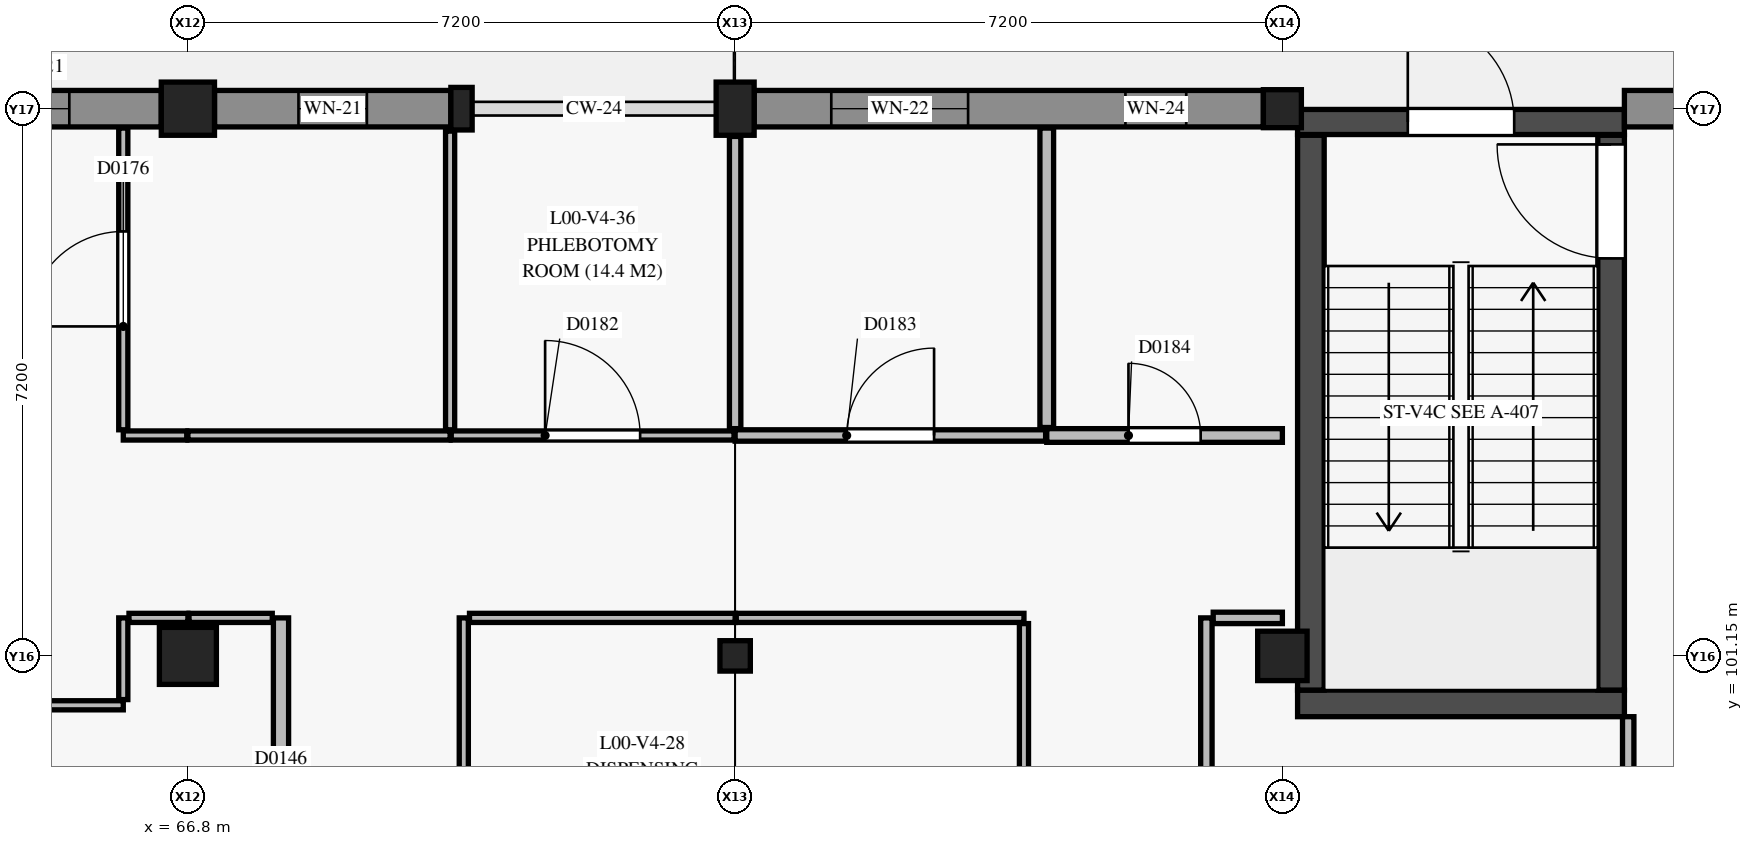
"""IFC4 building model, lengths in metres.
Left out: names, types, materials, properties, quantities, classifications, styles, units other than length and angle.
Written with IfcOpenShell. Run it as: python <this file> out.ifc"""

import sys

from ifc_helpers import new_model, si_unit, direction, frame, frame_2d, origin, origin_2d, place, context, subcontext, project, spatial, rectangle, circle, extrude, element, fill, save


model = new_model("IFC4")
c1 = context("Model", 3, precision=1e-05, world=origin(), true_north=direction((0.0, 1.0)))
c2 = subcontext(c1, "Body", "Model", "MODEL_VIEW")
j1 = project(units=[si_unit("LENGTHUNIT", "METRE"), si_unit("PLANEANGLEUNIT", "RADIAN")], contexts=[c1])
p1 = place(None, origin())
s1 = spatial("IfcSite", under=j1, at=p1, CompositionType="ELEMENT")
p2 = place(p1, origin())
s2 = spatial("IfcBuilding", under=s1, at=p2, CompositionType="ELEMENT")
p3 = place(p2, origin())
s3 = spatial("IfcBuildingStorey", under=s2, at=p3, CompositionType="ELEMENT", Elevation=0.0)
p4 = place(p3, frame((66.8, 101.15, 0.0), z_axis=(0.0, 0.0, 1.0), x_axis=(1.0, 0.0, 0.0)))
e1 = element("IfcColumn", 1, at=p4, inside=s3, PredefinedType="COLUMN", context=c2, shape_type="SweptSolid", body=[
    extrude(rectangle(XDim=0.75, YDim=0.75, at=origin_2d()), origin(), (0.0, 0.0, 1.0), 4.8),
])
p5 = place(p3, frame((66.8, 108.35, 0.0), z_axis=(0.0, 0.0, 1.0), x_axis=(1.0, 0.0, 0.0)))
e2 = element("IfcColumn", 2, at=p5, inside=s3, PredefinedType="COLUMN", context=c2, shape_type="SweptSolid", body=[
    extrude(rectangle(XDim=0.7, YDim=0.7, at=origin_2d()), origin(), (0.0, 0.0, 1.0), 4.8),
])
p6 = place(p3, frame((74.0, 101.15, 0.0), z_axis=(0.0, 0.0, 1.0), x_axis=(1.0, 0.0, 0.0)))
e3 = element("IfcColumn", 3, at=p6, inside=s3, PredefinedType="COLUMN", context=c2, shape_type="SweptSolid", body=[
    extrude(rectangle(XDim=0.4, YDim=0.4, at=origin_2d()), origin(), (0.0, 0.0, 1.0), 4.8),
])
p7 = place(p3, frame((74.0, 108.35, 0.0), z_axis=(0.0, 0.0, 1.0), x_axis=(1.0, 0.0, 0.0)))
e4 = element("IfcColumn", 4, at=p7, inside=s3, PredefinedType="COLUMN", context=c2, shape_type="SweptSolid", body=[
    extrude(rectangle(XDim=0.5, YDim=0.7, at=origin_2d()), origin(), (0.0, 0.0, 1.0), 4.8),
])
p8 = place(p3, frame((81.2, 101.15, 0.0), z_axis=(0.0, 0.0, 1.0), x_axis=(1.0, 0.0, 0.0)))
e5 = element("IfcColumn", 5, at=p8, inside=s3, PredefinedType="COLUMN", context=c2, shape_type="SweptSolid", body=[
    extrude(rectangle(XDim=0.65, YDim=0.65, at=origin_2d()), origin(), (0.0, 0.0, 1.0), 4.8),
])
p9 = place(p3, frame((81.2, 108.35, 0.0), z_axis=(0.0, 0.0, 1.0), x_axis=(1.0, 0.0, 0.0)))
e6 = element("IfcColumn", 6, at=p9, inside=s3, PredefinedType="COLUMN", context=c2, shape_type="SweptSolid", body=[
    extrude(circle(Radius=0.25, at=origin_2d()), origin(), (0.0, 0.0, 1.0), 4.8),
])
p10 = place(p3, frame((70.4, 108.35, 0.0), z_axis=(0.0, 0.0, 1.0), x_axis=(1.0, 0.0, 0.0)))
e7 = element("IfcColumn", 7, at=p10, inside=s3, PredefinedType="PILASTER", context=c2, shape_type="SweptSolid", body=[
    extrude(rectangle(XDim=0.28, YDim=0.56, at=origin_2d()), origin(), (0.0, 0.0, 1.0), 4.8),
])
p11 = place(p3, frame((81.4, 100.525, 0.0), z_axis=(0.0, 0.0, 1.0), x_axis=(1.0, 0.0, 0.0)))
e8 = element("IfcWall", 8, at=p11, inside=s3, PredefinedType="SHEAR", context=c2, shape_type="SweptSolid", body=[
    extrude(rectangle(XDim=4.3, YDim=0.35, at=frame_2d((2.15, 0.0))), origin(), (0.0, 0.0, 1.0), 4.55),
])
p12 = place(p3, frame((81.4, 108.175, 0.0), z_axis=(0.0, 0.0, 1.0), x_axis=(1.0, 0.0, 0.0)))
e9 = element("IfcWall", 9, at=p12, inside=s3, PredefinedType="SHEAR", context=c2, shape_type="SweptSolid", body=[
    extrude(rectangle(XDim=4.3, YDim=0.33, at=frame_2d((2.15, 0.0))), origin(), (0.0, 0.0, 1.0), 4.55),
])
p13 = place(p12, frame((1.45, 0.0, 0.0)))
e10 = element("IfcOpeningElement", 10, at=p13, cuts=e9, PredefinedType="OPENING", context=c2, shape_type="SweptSolid", body=[
    extrude(rectangle(XDim=1.4, YDim=2.25, at=frame_2d((0.7, 1.125))), frame((0.0, 0.175, 0.0), z_axis=(0.0, -1.0, 0.0), x_axis=(1.0, 0.0, 0.0)), (0.0, 0.0, 1.0), 0.35),
])
p14 = place(p3, frame((81.575, 100.7, 0.0), z_axis=(0.0, 0.0, 1.0), x_axis=(0.0, 1.0, 0.0)))
e11 = element("IfcWall", 11, at=p14, inside=s3, PredefinedType="SHEAR", context=c2, shape_type="SweptSolid", body=[
    extrude(rectangle(XDim=7.3, YDim=0.35, at=frame_2d((3.65, 0.0))), origin(), (0.0, 0.0, 1.0), 4.55),
])
p15 = place(p3, frame((85.525, 100.7, 0.0), z_axis=(0.0, 0.0, 1.0), x_axis=(0.0, 1.0, 0.0)))
e12 = element("IfcWall", 12, at=p15, inside=s3, PredefinedType="SHEAR", context=c2, shape_type="SweptSolid", body=[
    extrude(rectangle(XDim=7.3, YDim=0.35, at=frame_2d((3.65, 0.0))), origin(), (0.0, 0.0, 1.0), 4.55),
])
p16 = place(p15, frame((5.68, 0.0, 0.0)))
e13 = element("IfcOpeningElement", 13, at=p16, cuts=e12, PredefinedType="OPENING", context=c2, shape_type="SweptSolid", body=[
    extrude(rectangle(XDim=1.5, YDim=2.15, at=frame_2d((0.75, 1.075))), frame((0.0, 0.185, 0.0), z_axis=(0.0, -1.0, 0.0), x_axis=(1.0, 0.0, 0.0)), (0.0, 0.0, 1.0), 0.37),
])
p17 = place(p3, frame((63.65, 108.35, 0.0), z_axis=(0.0, 0.0, 1.0), x_axis=(1.0, 0.0, 0.0)))
e14 = element("IfcWall", 14, at=p17, inside=s3, PredefinedType="SOLIDWALL", context=c2, shape_type="SweptSolid", body=[
    extrude(rectangle(XDim=2.8, YDim=0.48, at=frame_2d((1.4, 0.0))), origin(), (0.0, 0.0, 1.0), 3.73),
])
p18 = place(p17, frame((0.69, 0.0, 0.95)))
e15 = element("IfcOpeningElement", 15, at=p18, cuts=e14, PredefinedType="OPENING", context=c2, shape_type="SweptSolid", body=[
    extrude(rectangle(XDim=0.9, YDim=1.2, at=frame_2d((0.45, 0.6))), frame((0.0, 0.25, 0.0), z_axis=(0.0, -1.0, 0.0), x_axis=(1.0, 0.0, 0.0)), (0.0, 0.0, 1.0), 0.5),
])
p19 = place(p3, frame((67.15, 108.35, 0.0), z_axis=(0.0, 0.0, 1.0), x_axis=(1.0, 0.0, 0.0)))
e16 = element("IfcWall", 16, at=p19, inside=s3, PredefinedType="SOLIDWALL", context=c2, shape_type="SweptSolid", body=[
    extrude(rectangle(XDim=3.11, YDim=0.48, at=frame_2d((1.555, 0.0))), origin(), (0.0, 0.0, 1.0), 3.73),
])
p20 = place(p19, frame((1.105, 0.0, 0.9)))
e17 = element("IfcOpeningElement", 17, at=p20, cuts=e16, PredefinedType="OPENING", context=c2, shape_type="SweptSolid", body=[
    extrude(rectangle(XDim=0.9, YDim=1.2, at=frame_2d((0.45, 0.6))), frame((0.0, 0.25, 0.0), z_axis=(0.0, -1.0, 0.0), x_axis=(1.0, 0.0, 0.0)), (0.0, 0.0, 1.0), 0.5),
])
p21 = place(p3, frame((74.25, 108.35, 0.0), z_axis=(0.0, 0.0, 1.0), x_axis=(1.0, 0.0, 0.0)))
e18 = element("IfcWall", 18, at=p21, inside=s3, PredefinedType="SOLIDWALL", context=c2, shape_type="SweptSolid", body=[
    extrude(rectangle(XDim=6.7, YDim=0.48, at=frame_2d((3.35, 0.0))), origin(), (0.0, 0.0, 1.0), 3.73),
])
p22 = place(p21, frame((1.015, 0.0, 0.9)))
e19 = element("IfcOpeningElement", 19, at=p22, cuts=e18, PredefinedType="OPENING", context=c2, shape_type="SweptSolid", body=[
    extrude(rectangle(XDim=1.8, YDim=0.9, at=frame_2d((0.9, 0.45))), frame((0.0, 0.25, 0.0), z_axis=(0.0, -1.0, 0.0), x_axis=(1.0, 0.0, 0.0)), (0.0, 0.0, 1.0), 0.5),
])
p23 = place(p21, frame((4.885, 0.0, 0.6)))
e20 = element("IfcOpeningElement", 20, at=p23, cuts=e18, PredefinedType="OPENING", context=c2, shape_type="SweptSolid", body=[
    extrude(rectangle(XDim=0.8, YDim=2.6, at=frame_2d((0.4, 1.3))), frame((0.0, 0.25, 0.0), z_axis=(0.0, -1.0, 0.0), x_axis=(1.0, 0.0, 0.0)), (0.0, 0.0, 1.0), 0.5),
])
p24 = place(p3, frame((85.7, 108.35, 0.0), z_axis=(0.0, 0.0, 1.0), x_axis=(1.0, 0.0, 0.0)))
e21 = element("IfcWall", 21, at=p24, inside=s3, PredefinedType="SOLIDWALL", context=c2, shape_type="SweptSolid", body=[
    extrude(rectangle(XDim=2.475, YDim=0.48, at=frame_2d((1.238, 0.0))), origin(), (0.0, 0.0, 1.0), 3.73),
])
p25 = place(p24, frame((0.84, 0.0, 0.9)))
e22 = element("IfcOpeningElement", 22, at=p25, cuts=e21, PredefinedType="OPENING", context=c2, shape_type="SweptSolid", body=[
    extrude(rectangle(XDim=0.6, YDim=1.8, at=frame_2d((0.3, 0.9))), frame((0.0, 0.25, 0.0), z_axis=(0.0, -1.0, 0.0), x_axis=(1.0, 0.0, 0.0)), (0.0, 0.0, 1.0), 0.5),
])
p26 = place(p3, frame((68.025, 95.85, 0.0), z_axis=(0.0, 0.0, 1.0), x_axis=(0.0, 1.0, 0.0)))
e23 = element("IfcWall", 23, at=p26, inside=s3, PredefinedType="PARTITIONING", context=c2, shape_type="SweptSolid", body=[
    extrude(rectangle(XDim=5.8, YDim=0.2, at=frame_2d((2.9, 0.0))), origin(), (0.0, 0.0, 1.0), 4.055),
])
p27 = place(p26, frame((1.496, 0.0, 0.0)))
e24 = element("IfcOpeningElement", 24, at=p27, cuts=e23, PredefinedType="OPENING", context=c2, shape_type="SweptSolid", body=[
    extrude(rectangle(XDim=1.4, YDim=2.2, at=frame_2d((0.7, 1.1))), frame((0.0, 0.11, 0.0), z_axis=(0.0, -1.0, 0.0), x_axis=(1.0, 0.0, 0.0)), (0.0, 0.0, 1.0), 0.22),
])
p28 = place(p3, frame((78.1, 104.05, 0.0), z_axis=(0.0, 0.0, 1.0), x_axis=(1.0, 0.0, 0.0)))
e25 = element("IfcWall", 25, at=p28, inside=s3, PredefinedType="PLUMBINGWALL", context=c2, shape_type="SweptSolid", body=[
    extrude(rectangle(XDim=3.1, YDim=0.18, at=frame_2d((1.55, 0.0))), origin(), (0.0, 0.0, 1.0), 3.885),
])
p29 = place(p28, frame((1.075, 0.0, 0.0)))
e26 = element("IfcOpeningElement", 26, at=p29, cuts=e25, PredefinedType="OPENING", context=c2, shape_type="SweptSolid", body=[
    extrude(rectangle(XDim=0.95, YDim=2.1, at=frame_2d((0.475, 1.05))), frame((0.0, 0.1, 0.0), z_axis=(0.0, -1.0, 0.0), x_axis=(1.0, 0.0, 0.0)), (0.0, 0.0, 1.0), 0.2),
])
p30 = place(p3, frame((85.75, 91.55, 0.0), z_axis=(0.0, 0.0, 1.0), x_axis=(0.0, 1.0, 0.0)))
e27 = element("IfcWall", 27, at=p30, inside=s3, PredefinedType="PARTITIONING", context=c2, shape_type="SweptSolid", body=[
    extrude(rectangle(XDim=8.8, YDim=0.15, at=frame_2d((4.4, 0.0))), origin(), (0.0, 0.0, 1.0), 3.885),
])
p31 = place(p3, frame((80.2, 91.64, 0.0), z_axis=(0.0, 0.0, 1.0), x_axis=(0.0, 1.0, 0.0)))
e28 = element("IfcWall", 28, at=p31, inside=s3, PredefinedType="PARTITIONING", context=c2, shape_type="SweptSolid", body=[
    extrude(rectangle(XDim=10.01, YDim=0.15, at=frame_2d((5.005, 0.0))), origin(), (0.0, 0.0, 1.0), 3.815),
])
p32 = place(p31, frame((4.505, 0.0, 0.0)))
e29 = element("IfcOpeningElement", 29, at=p32, cuts=e28, PredefinedType="OPENING", context=c2, shape_type="SweptSolid", body=[
    extrude(rectangle(XDim=1.0, YDim=2.15, at=frame_2d((0.5, 1.075))), frame((0.0, 0.085, 0.0), z_axis=(0.0, -1.0, 0.0), x_axis=(1.0, 0.0, 0.0)), (0.0, 0.0, 1.0), 0.17),
])
p33 = place(p3, frame((80.29, 101.65, 0.0), z_axis=(0.0, 0.0, 1.0), x_axis=(1.0, 0.0, 0.0)))
e30 = element("IfcWall", 30, at=p33, inside=s3, PredefinedType="PARTITIONING", context=c2, shape_type="SweptSolid", body=[
    extrude(rectangle(XDim=0.91, YDim=0.15, at=frame_2d((0.455, 0.0))), origin(), (0.0, 0.0, 1.0), 3.885),
])
p34 = place(p3, frame((74.0, 104.05, 0.0), z_axis=(0.0, 0.0, 1.0), x_axis=(1.0, 0.0, 0.0)))
e31 = element("IfcWall", 31, at=p34, inside=s3, PredefinedType="PARTITIONING", context=c2, shape_type="SweptSolid", body=[
    extrude(rectangle(XDim=4.085, YDim=0.15, at=frame_2d((2.042, 0.0))), origin(), (0.0, 0.0, 1.0), 4.015),
])
p35 = place(p34, frame((1.468, 0.0, 0.0)))
e32 = element("IfcOpeningElement", 32, at=p35, cuts=e31, PredefinedType="OPENING", context=c2, shape_type="SweptSolid", body=[
    extrude(rectangle(XDim=1.15, YDim=2.15, at=frame_2d((0.575, 1.075))), frame((0.0, 0.085, 0.0), z_axis=(0.0, -1.0, 0.0), x_axis=(1.0, 0.0, 0.0)), (0.0, 0.0, 1.0), 0.17),
])
p36 = place(p3, frame((70.43, 94.4, 0.0), z_axis=(0.0, 0.0, 1.0), x_axis=(0.0, 1.0, 0.0)))
e33 = element("IfcWall", 33, at=p36, inside=s3, PredefinedType="PARTITIONING", context=c2, shape_type="SweptSolid", body=[
    extrude(rectangle(XDim=7.25, YDim=0.12, at=frame_2d((3.625, 0.0))), origin(), (0.0, 0.0, 1.0), 4.055),
])
p37 = place(p36, frame((3.15, 0.0, 0.0)))
e34 = element("IfcOpeningElement", 34, at=p37, cuts=e33, PredefinedType="OPENING", context=c2, shape_type="SweptSolid", body=[
    extrude(rectangle(XDim=0.95, YDim=2.1, at=frame_2d((0.475, 1.05))), frame((0.0, 0.07, 0.0), z_axis=(0.0, -1.0, 0.0), x_axis=(1.0, 0.0, 0.0)), (0.0, 0.0, 1.0), 0.14),
])
p38 = place(p3, frame((70.505, 101.65, 0.0), z_axis=(0.0, 0.0, 1.0), x_axis=(1.0, 0.0, 0.0)))
e35 = element("IfcWall", 35, at=p38, inside=s3, PredefinedType="PARTITIONING", context=c2, shape_type="SweptSolid", body=[
    extrude(rectangle(XDim=3.495, YDim=0.12, at=frame_2d((1.748, 0.0))), origin(), (0.0, 0.0, 1.0), 4.015),
])
p39 = place(p3, frame((74.015, 101.65, 0.0), z_axis=(0.0, 0.0, 1.0), x_axis=(1.0, 0.0, 0.0)))
e36 = element("IfcWall", 36, at=p39, inside=s3, PredefinedType="PARTITIONING", context=c2, shape_type="SweptSolid", body=[
    extrude(rectangle(XDim=3.785, YDim=0.12, at=frame_2d((1.893, 0.0))), origin(), (0.0, 0.0, 1.0), 4.015),
])
p40 = place(p3, frame((77.8, 99.4, 0.0), z_axis=(0.0, 0.0, 1.0), x_axis=(0.0, 1.0, 0.0)))
e37 = element("IfcWall", 37, at=p40, inside=s3, PredefinedType="PARTITIONING", context=c2, shape_type="SweptSolid", body=[
    extrude(rectangle(XDim=2.175, YDim=0.12, at=frame_2d((1.087, 0.0))), origin(), (0.0, 0.0, 1.0), 3.815),
])
p41 = place(p3, frame((66.8, 104.05, 0.0), z_axis=(0.0, 0.0, 1.0), x_axis=(1.0, 0.0, 0.0)))
e38 = element("IfcWall", 38, at=p41, inside=s3, PredefinedType="PARTITIONING", context=c2, shape_type="SweptSolid", body=[
    extrude(rectangle(XDim=3.45, YDim=0.12, at=frame_2d((1.725, 0.0))), origin(), (0.0, 0.0, 1.0), 3.815),
])
p42 = place(p3, frame((65.95, 104.05, 0.0), z_axis=(0.0, 0.0, 1.0), x_axis=(1.0, 0.0, 0.0)))
e39 = element("IfcWall", 39, at=p42, inside=s3, PredefinedType="PARTITIONING", context=c2, shape_type="SweptSolid", body=[
    extrude(rectangle(XDim=0.835, YDim=0.12, at=frame_2d((0.417, 0.0))), origin(), (0.0, 0.0, 1.0), 3.815),
])
p43 = place(p3, frame((65.95, 104.125, 0.0), z_axis=(0.0, 0.0, 1.0), x_axis=(0.0, 1.0, 0.0)))
e40 = element("IfcWall", 40, at=p43, inside=s3, PredefinedType="PARTITIONING", context=c2, shape_type="SweptSolid", body=[
    extrude(rectangle(XDim=3.97, YDim=0.12, at=frame_2d((1.985, 0.0))), origin(), (0.0, 0.0, 1.0), 4.55),
])
p44 = place(p43, frame((1.36, 0.0, 0.0)))
e41 = element("IfcOpeningElement", 41, at=p44, cuts=e40, PredefinedType="OPENING", context=c2, shape_type="SweptSolid", body=[
    extrude(rectangle(XDim=1.25, YDim=2.15, at=frame_2d((0.625, 1.075))), frame((0.0, 0.07, 0.0), z_axis=(0.0, -1.0, 0.0), x_axis=(1.0, 0.0, 0.0)), (0.0, 0.0, 1.0), 0.14),
])
p45 = place(p3, frame((63.665, 100.5, 0.0), z_axis=(0.0, 0.0, 1.0), x_axis=(1.0, 0.0, 0.0)))
e42 = element("IfcWall", 42, at=p45, inside=s3, PredefinedType="PARTITIONING", context=c2, shape_type="SweptSolid", body=[
    extrude(rectangle(XDim=2.285, YDim=0.12, at=frame_2d((1.143, 0.0))), origin(), (0.0, 0.0, 1.0), 4.55),
])
p46 = place(p3, frame((65.95, 100.575, 0.0), z_axis=(0.0, 0.0, 1.0), x_axis=(0.0, 1.0, 0.0)))
e43 = element("IfcWall", 43, at=p46, inside=s3, PredefinedType="PARTITIONING", context=c2, shape_type="SweptSolid", body=[
    extrude(rectangle(XDim=1.075, YDim=0.12, at=frame_2d((0.538, 0.0))), origin(), (0.0, 0.0, 1.0), 4.55),
])
p47 = place(p3, frame((66.025, 101.65, 0.0), z_axis=(0.0, 0.0, 1.0), x_axis=(1.0, 0.0, 0.0)))
e44 = element("IfcWall", 44, at=p47, inside=s3, PredefinedType="PARTITIONING", context=c2, shape_type="SweptSolid", body=[
    extrude(rectangle(XDim=0.775, YDim=0.12, at=frame_2d((0.388, 0.0))), origin(), (0.0, 0.0, 1.0), 3.815),
])
p48 = place(p3, frame((66.815, 101.65, 0.0), z_axis=(0.0, 0.0, 1.0), x_axis=(1.0, 0.0, 0.0)))
e45 = element("IfcWall", 45, at=p48, inside=s3, PredefinedType="PARTITIONING", context=c2, shape_type="SweptSolid", body=[
    extrude(rectangle(XDim=1.095, YDim=0.12, at=frame_2d((0.547, 0.0))), origin(), (0.0, 0.0, 1.0), 3.815),
])
p49 = place(p3, frame((70.265, 104.05, 0.0), z_axis=(0.0, 0.0, 1.0), x_axis=(1.0, 0.0, 0.0)))
e46 = element("IfcWall", 46, at=p49, inside=s3, PredefinedType="PARTITIONING", context=c2, shape_type="SweptSolid", body=[
    extrude(rectangle(XDim=3.72, YDim=0.12, at=frame_2d((1.86, 0.0))), origin(), (0.0, 0.0, 1.0), 4.015),
])
p50 = place(p49, frame((1.235, 0.0, 0.0)))
e47 = element("IfcOpeningElement", 47, at=p50, cuts=e46, PredefinedType="OPENING", context=c2, shape_type="SweptSolid", body=[
    extrude(rectangle(XDim=1.25, YDim=2.15, at=frame_2d((0.625, 1.075))), frame((0.0, 0.07, 0.0), z_axis=(0.0, -1.0, 0.0), x_axis=(1.0, 0.0, 0.0)), (0.0, 0.0, 1.0), 0.14),
])
p51 = place(p3, frame((78.1, 104.155, 0.0), z_axis=(0.0, 0.0, 1.0), x_axis=(0.0, 1.0, 0.0)))
e48 = element("IfcWall", 48, at=p51, inside=s3, PredefinedType="PLUMBINGWALL", context=c2, shape_type="SweptSolid", body=[
    extrude(rectangle(XDim=3.94, YDim=0.18, at=frame_2d((1.97, 0.0))), origin(), (0.0, 0.0, 1.0), 4.115),
])
p52 = place(p3, frame((74.0, 104.14, 0.0), z_axis=(0.0, 0.0, 1.0), x_axis=(0.0, 1.0, 0.0)))
e49 = element("IfcWall", 49, at=p52, inside=s3, PredefinedType="PARTITIONING", context=c2, shape_type="SweptSolid", body=[
    extrude(rectangle(XDim=3.845, YDim=0.15, at=frame_2d((1.923, 0.0))), origin(), (0.0, 0.0, 1.0), 4.015),
])
p53 = place(p3, frame((70.25, 104.125, 0.0), z_axis=(0.0, 0.0, 1.0), x_axis=(0.0, 1.0, 0.0)))
e50 = element("IfcWall", 50, at=p53, inside=s3, PredefinedType="PARTITIONING", context=c2, shape_type="SweptSolid", body=[
    extrude(rectangle(XDim=3.93, YDim=0.12, at=frame_2d((1.965, 0.0))), origin(), (0.0, 0.0, 1.0), 4.075),
])
p54 = place(p13, origin())
e51 = element("IfcDoor", 51, at=p54, inside=s3, OperationType="SINGLE_SWING_LEFT", PredefinedType="DOOR", context=c2, shape_type="SweptSolid", body=[
    extrude(rectangle(XDim=1.4, YDim=2.25, at=frame_2d((0.7, 1.125))), frame((0.0, 0.025, 0.0), z_axis=(0.0, -1.0, 0.0), x_axis=(1.0, 0.0, 0.0)), (0.0, 0.0, 1.0), 0.05),
])
fill(e10, e51)
p55 = place(p18, origin())
e52 = element("IfcWindow", 52, at=p55, inside=s3, PartitioningType="SINGLE_PANEL", PredefinedType="WINDOW", context=c2, shape_type="SweptSolid", body=[
    extrude(rectangle(XDim=0.9, YDim=1.2, at=frame_2d((0.45, 0.6))), frame((0.0, 0.03, 0.0), z_axis=(0.0, -1.0, 0.0), x_axis=(1.0, 0.0, 0.0)), (0.0, 0.0, 1.0), 0.06),
])
fill(e15, e52)
p56 = place(p20, origin())
e53 = element("IfcWindow", 53, at=p56, inside=s3, PartitioningType="SINGLE_PANEL", PredefinedType="WINDOW", context=c2, shape_type="SweptSolid", body=[
    extrude(rectangle(XDim=0.9, YDim=1.2, at=frame_2d((0.45, 0.6))), frame((0.0, 0.03, 0.0), z_axis=(0.0, -1.0, 0.0), x_axis=(1.0, 0.0, 0.0)), (0.0, 0.0, 1.0), 0.06),
])
fill(e17, e53)
p57 = place(p22, origin())
e54 = element("IfcWindow", 54, at=p57, inside=s3, PartitioningType="SINGLE_PANEL", PredefinedType="WINDOW", context=c2, shape_type="SweptSolid", body=[
    extrude(rectangle(XDim=1.8, YDim=0.9, at=frame_2d((0.9, 0.45))), frame((0.0, 0.03, 0.0), z_axis=(0.0, -1.0, 0.0), x_axis=(1.0, 0.0, 0.0)), (0.0, 0.0, 1.0), 0.06),
])
fill(e19, e54)
p58 = place(p23, origin())
e55 = element("IfcWindow", 55, at=p58, inside=s3, PartitioningType="SINGLE_PANEL", PredefinedType="WINDOW", context=c2, shape_type="SweptSolid", body=[
    extrude(rectangle(XDim=0.8, YDim=2.6, at=frame_2d((0.4, 1.3))), frame((0.0, 0.03, 0.0), z_axis=(0.0, -1.0, 0.0), x_axis=(1.0, 0.0, 0.0)), (0.0, 0.0, 1.0), 0.06),
])
fill(e20, e55)
p59 = place(p16, origin())
e56 = element("IfcDoor", 56, at=p59, inside=s3, OperationType="SINGLE_SWING_RIGHT", PredefinedType="DOOR", context=c2, shape_type="SweptSolid", body=[
    extrude(rectangle(XDim=1.5, YDim=2.15, at=frame_2d((0.75, 1.075))), frame((0.0, 0.025, 0.0), z_axis=(0.0, -1.0, 0.0), x_axis=(1.0, 0.0, 0.0)), (0.0, 0.0, 1.0), 0.05),
])
fill(e13, e56)
p60 = place(p44, origin())
e57 = element("IfcDoor", 57, at=p60, inside=s3, OperationType="SINGLE_SWING_LEFT", PredefinedType="DOOR", context=c2, shape_type="SweptSolid", body=[
    extrude(rectangle(XDim=1.25, YDim=2.15, at=frame_2d((0.625, 1.075))), frame((0.0, 0.025, 0.0), z_axis=(0.0, -1.0, 0.0), x_axis=(1.0, 0.0, 0.0)), (0.0, 0.0, 1.0), 0.05),
])
fill(e41, e57)
p61 = place(p50, origin())
e58 = element("IfcDoor", 58, at=p61, inside=s3, OperationType="SINGLE_SWING_LEFT", PredefinedType="DOOR", context=c2, shape_type="SweptSolid", body=[
    extrude(rectangle(XDim=1.25, YDim=2.15, at=frame_2d((0.625, 1.075))), frame((0.0, 0.025, 0.0), z_axis=(0.0, -1.0, 0.0), x_axis=(1.0, 0.0, 0.0)), (0.0, 0.0, 1.0), 0.05),
])
fill(e47, e58)
p62 = place(p35, origin())
e59 = element("IfcDoor", 59, at=p62, inside=s3, OperationType="SINGLE_SWING_RIGHT", PredefinedType="DOOR", context=c2, shape_type="SweptSolid", body=[
    extrude(rectangle(XDim=1.15, YDim=2.15, at=frame_2d((0.575, 1.075))), frame((0.0, 0.025, 0.0), z_axis=(0.0, -1.0, 0.0), x_axis=(1.0, 0.0, 0.0)), (0.0, 0.0, 1.0), 0.05),
])
fill(e32, e59)
p63 = place(p29, origin())
e60 = element("IfcDoor", 60, at=p63, inside=s3, OperationType="SINGLE_SWING_LEFT", PredefinedType="DOOR", context=c2, shape_type="SweptSolid", body=[
    extrude(rectangle(XDim=0.95, YDim=2.1, at=frame_2d((0.475, 1.05))), frame((0.0, 0.025, 0.0), z_axis=(0.0, -1.0, 0.0), x_axis=(1.0, 0.0, 0.0)), (0.0, 0.0, 1.0), 0.05),
])
fill(e26, e60)
save(model, sys.argv[1])
